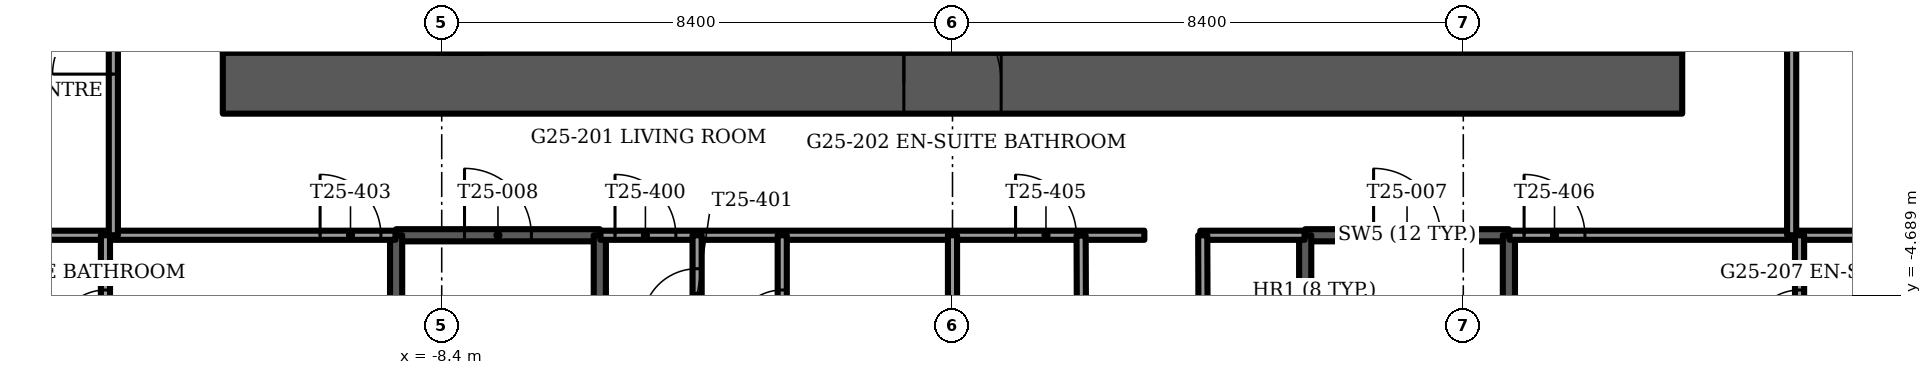
"""IFC4 building model, lengths in metres.
Left out: names, types, materials, properties, quantities, classifications, styles, units other than length and angle.
Written with IfcOpenShell. Run it as: python <this file> out.ifc"""

import sys

from ifc_helpers import new_model, si_unit, direction, frame, frame_2d, origin, place, context, subcontext, project, spatial, rectangle, extrude, element, fill, save


model = new_model("IFC4")
c1 = context("Model", 3, precision=1e-05, world=origin(), true_north=direction((0.0, 1.0)))
c2 = subcontext(c1, "Body", "Model", "MODEL_VIEW")
j1 = project(units=[si_unit("LENGTHUNIT", "METRE"), si_unit("PLANEANGLEUNIT", "RADIAN")], contexts=[c1])
p1 = place(None, origin())
s1 = spatial("IfcSite", under=j1, at=p1, CompositionType="ELEMENT")
p2 = place(p1, origin())
s2 = spatial("IfcBuilding", under=s1, at=p2, CompositionType="ELEMENT")
p3 = place(p2, frame((0.0, 0.0, 100.5)))
s3 = spatial("IfcBuildingStorey", under=s2, at=p3, CompositionType="ELEMENT", Elevation=100.5)
p4 = place(p3, frame((-12.0, -1.2, -0.3), z_axis=(0.0, 0.0, 1.0), x_axis=(1.0, 0.0, 0.0)))
e1 = element("IfcWall", 1, at=p4, inside=s3, PredefinedType="SHEAR", context=c2, shape_type="SweptSolid", body=[
    extrude(rectangle(XDim=24.0, YDim=1.0, at=frame_2d((12.0, 0.0))), origin(), (0.0, 0.0, 1.0), 3.75),
])
p5 = place(p4, frame((11.2, 0.0, 0.0)))
e2 = element("IfcOpeningElement", 2, at=p5, cuts=e1, PredefinedType="OPENING", context=c2, shape_type="SweptSolid", body=[
    extrude(rectangle(XDim=1.6, YDim=2.1, at=frame_2d((0.8, 1.05))), frame((0.0, 0.5, 0.0), z_axis=(0.0, -1.0, 0.0), x_axis=(1.0, 0.0, 0.0)), (0.0, 0.0, 1.0), 1.0),
])
p6 = place(p3, frame((-19.047, -0.86, 0.0), z_axis=(0.0, 0.0, 1.0), x_axis=(0.499999897272, -0.866025463095, 0.0)))
e3 = element("IfcWall", 3, at=p6, inside=s3, PredefinedType="SOLIDWALL", context=c2, shape_type="SweptSolid", body=[
    extrude(rectangle(XDim=11.426, YDim=0.15, at=frame_2d((5.713, 0.0))), origin(), (0.0, 0.0, 1.0), 3.45),
])
p7 = place(p6, frame((4.406, 0.0, 0.15)))
e4 = element("IfcOpeningElement", 4, at=p7, cuts=e3, PredefinedType="OPENING", context=c2, shape_type="SweptSolid", body=[
    extrude(rectangle(XDim=1.5, YDim=2.2, at=frame_2d((0.75, 1.1))), frame((0.0, 0.075, 0.0), z_axis=(0.0, -1.0, 0.0), x_axis=(1.0, 0.0, 0.0)), (0.0, 0.0, 1.0), 0.15),
])
p8 = place(p6, frame((6.979, 0.0, 0.15)))
e5 = element("IfcOpeningElement", 5, at=p8, cuts=e3, PredefinedType="OPENING", context=c2, shape_type="SweptSolid", body=[
    extrude(rectangle(XDim=1.7, YDim=2.2, at=frame_2d((0.85, 1.1))), frame((0.0, 0.075, 0.0), z_axis=(0.0, -1.0, 0.0), x_axis=(1.0, 0.0, 0.0)), (0.0, 0.0, 1.0), 0.15),
])
p9 = place(p3, frame((13.334, -10.755, 0.0), z_axis=(0.0, 0.0, 1.0), x_axis=(0.499999897272, 0.866025463095, 0.0)))
e6 = element("IfcWall", 6, at=p9, inside=s3, PredefinedType="SOLIDWALL", context=c2, shape_type="SweptSolid", body=[
    extrude(rectangle(XDim=11.426, YDim=0.15, at=frame_2d((5.713, 0.0))), origin(), (0.0, 0.0, 1.0), 3.45),
])
p10 = place(p9, frame((0.847, 0.0, 0.15)))
e7 = element("IfcOpeningElement", 7, at=p10, cuts=e6, PredefinedType="OPENING", context=c2, shape_type="SweptSolid", body=[
    extrude(rectangle(XDim=1.7, YDim=2.2, at=frame_2d((0.85, 1.1))), frame((0.0, 0.075, 0.0), z_axis=(0.0, -1.0, 0.0), x_axis=(1.0, 0.0, 0.0)), (0.0, 0.0, 1.0), 0.15),
])
p11 = place(p9, frame((6.322, 0.0, 0.15)))
e8 = element("IfcOpeningElement", 8, at=p11, cuts=e6, PredefinedType="OPENING", context=c2, shape_type="SweptSolid", body=[
    extrude(rectangle(XDim=1.5, YDim=2.2, at=frame_2d((0.75, 1.1))), frame((0.0, 0.075, 0.0), z_axis=(0.0, -1.0, 0.0), x_axis=(1.0, 0.0, 0.0)), (0.0, 0.0, 1.0), 0.15),
])
for number, where, z_axis, x_axis in (
    (9, (-6.4, -0.7, 0.0), (0.0, 0.0, 1.0), (0.0, 1.0, 0.0)),
    (10, (-5.1, -0.7, 0.0), (0.0, 0.0, 1.0), (0.0, 1.0, 0.0)),
    (11, (5.1, -0.7, 0.0), (0.0, 0.0, 1.0), (0.0, 1.0, 0.0)),
    (12, (6.4, -0.7, 0.0), (0.0, 0.0, 1.0), (0.0, 1.0, 0.0)),
):
    element("IfcWall", number, at=place(p3, frame(where, z_axis=z_axis, x_axis=x_axis)), inside=s3, PredefinedType="PARTITIONING", context=c2, shape_type="SweptSolid", body=[
        extrude(rectangle(XDim=1.6, YDim=0.15, at=frame_2d((0.8, 0.0))), origin(), (0.0, 0.0, 1.0), 3.45),
    ])
p12 = place(p3, frame((5.8, -3.7, -0.3), z_axis=(0.0, 0.0, 1.0), x_axis=(1.0, 0.0, 0.0)))
e13 = element("IfcWall", 13, at=p12, inside=s3, PredefinedType="SOLIDWALL", context=c2, shape_type="SweptSolid", body=[
    extrude(rectangle(XDim=3.35, YDim=0.2, at=frame_2d((1.675, 0.0))), origin(), (0.0, 0.0, 1.0), 3.75),
])
p13 = place(p12, frame((1.125, 0.0, 0.0)))
e14 = element("IfcOpeningElement", 14, at=p13, cuts=e13, PredefinedType="OPENING", context=c2, shape_type="SweptSolid", body=[
    extrude(rectangle(XDim=1.1, YDim=2.1, at=frame_2d((0.55, 1.05))), frame((0.0, 0.1, 0.0), z_axis=(0.0, -1.0, 0.0), x_axis=(1.0, 0.0, 0.0)), (0.0, 0.0, 1.0), 0.2),
])
for number, where, z_axis, x_axis in (
    (15, (5.8, -3.7, -0.3), (0.0, 0.0, 1.0), (0.0, -1.0, 0.0)),
    (16, (9.15, -3.7, -0.3), (0.0, 0.0, 1.0), (0.0, -1.0, 0.0)),
):
    element("IfcWall", number, at=place(p3, frame(where, z_axis=z_axis, x_axis=x_axis)), inside=s3, PredefinedType="SOLIDWALL", context=c2, shape_type="SweptSolid", body=[
        extrude(rectangle(XDim=7.7, YDim=0.2, at=frame_2d((3.85, 0.0))), origin(), (0.0, 0.0, 1.0), 3.75),
    ])
p14 = place(p3, frame((-9.15, -3.7, -0.3), z_axis=(0.0, 0.0, 1.0), x_axis=(1.0, 0.0, 0.0)))
e17 = element("IfcWall", 17, at=p14, inside=s3, PredefinedType="SOLIDWALL", context=c2, shape_type="SweptSolid", body=[
    extrude(rectangle(XDim=3.35, YDim=0.2, at=frame_2d((1.675, 0.0))), origin(), (0.0, 0.0, 1.0), 3.75),
])
p15 = place(p14, frame((1.125, 0.0, 0.0)))
e18 = element("IfcOpeningElement", 18, at=p15, cuts=e17, PredefinedType="OPENING", context=c2, shape_type="SweptSolid", body=[
    extrude(rectangle(XDim=1.1, YDim=2.1, at=frame_2d((0.55, 1.05))), frame((0.0, 0.1, 0.0), z_axis=(0.0, -1.0, 0.0), x_axis=(1.0, 0.0, 0.0)), (0.0, 0.0, 1.0), 0.2),
])
for number, where, z_axis, x_axis in (
    (19, (-9.15, -3.7, -0.3), (0.0, 0.0, 1.0), (0.0, -1.0, 0.0)),
    (20, (-5.8, -3.7, -0.3), (0.0, 0.0, 1.0), (0.0, -1.0, 0.0)),
):
    element("IfcWall", number, at=place(p3, frame(where, z_axis=z_axis, x_axis=x_axis)), inside=s3, PredefinedType="SOLIDWALL", context=c2, shape_type="SweptSolid", body=[
        extrude(rectangle(XDim=7.7, YDim=0.2, at=frame_2d((3.85, 0.0))), origin(), (0.0, 0.0, 1.0), 3.75),
    ])
p16 = place(p3, frame((-17.459, -3.7, 0.0), z_axis=(0.0, 0.0, 1.0), x_axis=(1.0, 0.0, 0.0)))
e21 = element("IfcWall", 21, at=p16, inside=s3, PredefinedType="PARTITIONING", context=c2, shape_type="SweptSolid", body=[
    extrude(rectangle(XDim=8.299, YDim=0.15, at=frame_2d((4.149, 0.0))), origin(), (0.0, 0.0, 1.0), 3.45),
])
p17 = place(p16, frame((7.059, 0.0, 0.0)))
e22 = element("IfcOpeningElement", 22, at=p17, cuts=e21, PredefinedType="OPENING", context=c2, shape_type="SweptSolid", body=[
    extrude(rectangle(XDim=1.0, YDim=2.1, at=frame_2d((0.5, 1.05))), frame((0.0, 0.075, 0.0), z_axis=(0.0, -1.0, 0.0), x_axis=(1.0, 0.0, 0.0)), (0.0, 0.0, 1.0), 0.15),
])
p18 = place(p3, frame((-5.79, -3.7, 0.0), z_axis=(0.0, 0.0, 1.0), x_axis=(1.0, 0.0, 0.0)))
e23 = element("IfcWall", 23, at=p18, inside=s3, PredefinedType="PARTITIONING", context=c2, shape_type="SweptSolid", body=[
    extrude(rectangle(XDim=8.945, YDim=0.15, at=frame_2d((4.473, 0.0))), origin(), (0.0, 0.0, 1.0), 3.45),
])
p19 = place(p18, frame((0.24, 0.0, 0.0)))
e24 = element("IfcOpeningElement", 24, at=p19, cuts=e23, PredefinedType="OPENING", context=c2, shape_type="SweptSolid", body=[
    extrude(rectangle(XDim=1.0, YDim=2.1, at=frame_2d((0.5, 1.05))), frame((0.0, 0.075, 0.0), z_axis=(0.0, -1.0, 0.0), x_axis=(1.0, 0.0, 0.0)), (0.0, 0.0, 1.0), 0.15),
])
p20 = place(p18, frame((6.827, 0.0, 0.0)))
e25 = element("IfcOpeningElement", 25, at=p20, cuts=e23, PredefinedType="OPENING", context=c2, shape_type="SweptSolid", body=[
    extrude(rectangle(XDim=1.0, YDim=2.1, at=frame_2d((0.5, 1.05))), frame((0.0, 0.075, 0.0), z_axis=(0.0, -1.0, 0.0), x_axis=(1.0, 0.0, 0.0)), (0.0, 0.0, 1.0), 0.15),
])
p21 = place(p3, frame((4.075, -3.7, 0.0), z_axis=(0.0, 0.0, 1.0), x_axis=(1.0, 0.0, 0.0)))
e26 = element("IfcWall", 26, at=p21, inside=s3, PredefinedType="PARTITIONING", context=c2, shape_type="SweptSolid", body=[
    extrude(rectangle(XDim=1.715, YDim=0.15, at=frame_2d((0.857, 0.0))), origin(), (0.0, 0.0, 1.0), 3.45),
])
p22 = place(p3, frame((9.16, -3.7, 0.0), z_axis=(0.0, 0.0, 1.0), x_axis=(1.0, 0.0, 0.0)))
e27 = element("IfcWall", 27, at=p22, inside=s3, PredefinedType="PARTITIONING", context=c2, shape_type="SweptSolid", body=[
    extrude(rectangle(XDim=8.299, YDim=0.15, at=frame_2d((4.149, 0.0))), origin(), (0.0, 0.0, 1.0), 3.45),
])
p23 = place(p22, frame((0.24, 0.0, 0.0)))
e28 = element("IfcOpeningElement", 28, at=p23, cuts=e27, PredefinedType="OPENING", context=c2, shape_type="SweptSolid", body=[
    extrude(rectangle(XDim=1.0, YDim=2.1, at=frame_2d((0.5, 1.05))), frame((0.0, 0.075, 0.0), z_axis=(0.0, -1.0, 0.0), x_axis=(1.0, 0.0, 0.0)), (0.0, 0.0, 1.0), 0.15),
])
p24 = place(p3, frame((13.93, -6.3, 0.0), z_axis=(0.0, 0.0, 1.0), x_axis=(0.0, 1.0, 0.0)))
e29 = element("IfcWall", 29, at=p24, inside=s3, PredefinedType="PARTITIONING", context=c2, shape_type="SweptSolid", body=[
    extrude(rectangle(XDim=2.6, YDim=0.15, at=frame_2d((1.3, 0.0))), origin(), (0.0, 0.0, 1.0), 3.45),
])
p25 = place(p24, frame((0.9, 0.0, 0.0)))
e30 = element("IfcOpeningElement", 30, at=p25, cuts=e29, PredefinedType="OPENING", context=c2, shape_type="SweptSolid", body=[
    extrude(rectangle(XDim=0.8, YDim=2.1, at=frame_2d((0.4, 1.05))), frame((0.0, 0.075, 0.0), z_axis=(0.0, -1.0, 0.0), x_axis=(1.0, 0.0, 0.0)), (0.0, 0.0, 1.0), 0.15),
])
p26 = place(p3, frame((13.8, -3.7, 0.0), z_axis=(0.0, 0.0, 1.0), x_axis=(0.0, 1.0, 0.0)))
e31 = element("IfcWall", 31, at=p26, inside=s3, PredefinedType="PARTITIONING", context=c2, shape_type="SweptSolid", body=[
    extrude(rectangle(XDim=13.083, YDim=0.15, at=frame_2d((6.542, 0.0))), origin(), (0.0, 0.0, 1.0), 3.45),
])
p27 = place(p26, frame((3.7, 0.0, 0.0)))
e32 = element("IfcOpeningElement", 32, at=p27, cuts=e31, PredefinedType="OPENING", context=c2, shape_type="SweptSolid", body=[
    extrude(rectangle(XDim=1.0, YDim=2.1, at=frame_2d((0.5, 1.05))), frame((0.0, 0.075, 0.0), z_axis=(0.0, -1.0, 0.0), x_axis=(1.0, 0.0, 0.0)), (0.0, 0.0, 1.0), 0.15),
])
p28 = place(p26, frame((10.12, 0.0, 0.0)))
e33 = element("IfcOpeningElement", 33, at=p28, cuts=e31, PredefinedType="OPENING", context=c2, shape_type="SweptSolid", body=[
    extrude(rectangle(XDim=1.0, YDim=2.1, at=frame_2d((0.5, 1.05))), frame((0.0, 0.075, 0.0), z_axis=(0.0, -1.0, 0.0), x_axis=(1.0, 0.0, 0.0)), (0.0, 0.0, 1.0), 0.15),
])
p29 = place(p3, frame((0.0, -9.01, 0.0), z_axis=(0.0, 0.0, 1.0), x_axis=(0.0, 1.0, 0.0)))
e34 = element("IfcWall", 34, at=p29, inside=s3, PredefinedType="PARTITIONING", context=c2, shape_type="SweptSolid", body=[
    extrude(rectangle(XDim=5.31, YDim=0.15, at=frame_2d((2.655, 0.0))), origin(), (0.0, 0.0, 1.0), 3.45),
])
p30 = place(p3, frame((-2.8, -6.3, 0.0), z_axis=(0.0, 0.0, 1.0), x_axis=(0.0, 1.0, 0.0)))
e35 = element("IfcWall", 35, at=p30, inside=s3, PredefinedType="PARTITIONING", context=c2, shape_type="SweptSolid", body=[
    extrude(rectangle(XDim=2.6, YDim=0.15, at=frame_2d((1.3, 0.0))), origin(), (0.0, 0.0, 1.0), 3.45),
])
p31 = place(p30, frame((0.9, 0.0, 0.0)))
e36 = element("IfcOpeningElement", 36, at=p31, cuts=e35, PredefinedType="OPENING", context=c2, shape_type="SweptSolid", body=[
    extrude(rectangle(XDim=0.8, YDim=2.1, at=frame_2d((0.4, 1.05))), frame((0.0, 0.075, 0.0), z_axis=(0.0, -1.0, 0.0), x_axis=(1.0, 0.0, 0.0)), (0.0, 0.0, 1.0), 0.15),
])
p32 = place(p3, frame((-4.2, -9.01, 0.0), z_axis=(0.0, 0.0, 1.0), x_axis=(0.0, 1.0, 0.0)))
e37 = element("IfcWall", 37, at=p32, inside=s3, PredefinedType="PARTITIONING", context=c2, shape_type="SweptSolid", body=[
    extrude(rectangle(XDim=5.31, YDim=0.15, at=frame_2d((2.655, 0.0))), origin(), (0.0, 0.0, 1.0), 3.45),
])
p33 = place(p32, frame((3.86, 0.0, 0.0)))
e38 = element("IfcOpeningElement", 38, at=p33, cuts=e37, PredefinedType="OPENING", context=c2, shape_type="SweptSolid", body=[
    extrude(rectangle(XDim=0.9, YDim=2.1, at=frame_2d((0.45, 1.05))), frame((0.0, 0.075, 0.0), z_axis=(0.0, -1.0, 0.0), x_axis=(1.0, 0.0, 0.0)), (0.0, 0.0, 1.0), 0.15),
])
p34 = place(p3, frame((-13.8, -3.7, 0.0), z_axis=(0.0, 0.0, 1.0), x_axis=(0.0, 1.0, 0.0)))
e39 = element("IfcWall", 39, at=p34, inside=s3, PredefinedType="PARTITIONING", context=c2, shape_type="SweptSolid", body=[
    extrude(rectangle(XDim=13.083, YDim=0.15, at=frame_2d((6.542, 0.0))), origin(), (0.0, 0.0, 1.0), 3.45),
])
p35 = place(p34, frame((2.65, 0.0, 0.0)))
e40 = element("IfcOpeningElement", 40, at=p35, cuts=e39, PredefinedType="OPENING", context=c2, shape_type="SweptSolid", body=[
    extrude(rectangle(XDim=1.0, YDim=2.1, at=frame_2d((0.5, 1.05))), frame((0.0, 0.075, 0.0), z_axis=(0.0, -1.0, 0.0), x_axis=(1.0, 0.0, 0.0)), (0.0, 0.0, 1.0), 0.15),
])
p36 = place(p34, frame((9.07, 0.0, 0.0)))
e41 = element("IfcOpeningElement", 41, at=p36, cuts=e39, PredefinedType="OPENING", context=c2, shape_type="SweptSolid", body=[
    extrude(rectangle(XDim=1.0, YDim=2.1, at=frame_2d((0.5, 1.05))), frame((0.0, 0.075, 0.0), z_axis=(0.0, -1.0, 0.0), x_axis=(1.0, 0.0, 0.0)), (0.0, 0.0, 1.0), 0.15),
])
p37 = place(p3, frame((-13.93, -6.3, 0.0), z_axis=(0.0, 0.0, 1.0), x_axis=(0.0, 1.0, 0.0)))
e42 = element("IfcWall", 42, at=p37, inside=s3, PredefinedType="PARTITIONING", context=c2, shape_type="SweptSolid", body=[
    extrude(rectangle(XDim=2.6, YDim=0.15, at=frame_2d((1.3, 0.0))), origin(), (0.0, 0.0, 1.0), 3.45),
])
p38 = place(p37, frame((0.9, 0.0, 0.0)))
e43 = element("IfcOpeningElement", 43, at=p38, cuts=e42, PredefinedType="OPENING", context=c2, shape_type="SweptSolid", body=[
    extrude(rectangle(XDim=0.8, YDim=2.1, at=frame_2d((0.4, 1.05))), frame((0.0, 0.075, 0.0), z_axis=(0.0, -1.0, 0.0), x_axis=(1.0, 0.0, 0.0)), (0.0, 0.0, 1.0), 0.15),
])
p39 = place(p3, frame((4.134, -8.87, 0.0), z_axis=(0.0, 0.0, 1.0), x_axis=(-0.003683216269, 0.999993216936, 0.0)))
e44 = element("IfcWall", 44, at=p39, inside=s3, PredefinedType="PARTITIONING", context=c2, shape_type="SweptSolid", body=[
    extrude(rectangle(XDim=5.17, YDim=0.15, at=frame_2d((2.585, 0.0))), origin(), (0.0, 0.0, 1.0), 3.45),
])
p40 = place(p3, frame((2.134, -8.87, 0.0), z_axis=(0.0, 0.0, 1.0), x_axis=(-0.003686872276, 0.999993203463, 0.0)))
e45 = element("IfcWall", 45, at=p40, inside=s3, PredefinedType="PARTITIONING", context=c2, shape_type="SweptSolid", body=[
    extrude(rectangle(XDim=5.165, YDim=0.15, at=frame_2d((2.583, 0.0))), origin(), (0.0, 0.0, 1.0), 3.45),
])
p41 = place(p5, origin())
e46 = element("IfcDoor", 46, at=p41, inside=s3, OperationType="DOUBLE_DOOR_SINGLE_SWING", PredefinedType="DOOR", context=c2, shape_type="SweptSolid", body=[
    extrude(rectangle(XDim=1.6, YDim=2.1, at=frame_2d((0.8, 1.05))), frame((0.0, 0.025, 0.0), z_axis=(0.0, -1.0, 0.0), x_axis=(1.0, 0.0, 0.0)), (0.0, 0.0, 1.0), 0.05),
])
fill(e2, e46)
p42 = place(p13, origin())
e47 = element("IfcDoor", 47, at=p42, inside=s3, OperationType="SINGLE_SWING_LEFT", PredefinedType="DOOR", context=c2, shape_type="SweptSolid", body=[
    extrude(rectangle(XDim=1.1, YDim=2.1, at=frame_2d((0.55, 1.05))), frame((0.0, 0.025, 0.0), z_axis=(0.0, -1.0, 0.0), x_axis=(1.0, 0.0, 0.0)), (0.0, 0.0, 1.0), 0.05),
])
fill(e14, e47)
p43 = place(p15, origin())
e48 = element("IfcDoor", 48, at=p43, inside=s3, OperationType="SINGLE_SWING_LEFT", PredefinedType="DOOR", context=c2, shape_type="SweptSolid", body=[
    extrude(rectangle(XDim=1.1, YDim=2.1, at=frame_2d((0.55, 1.05))), frame((0.0, 0.025, 0.0), z_axis=(0.0, -1.0, 0.0), x_axis=(1.0, 0.0, 0.0)), (0.0, 0.0, 1.0), 0.05),
])
fill(e18, e48)
p44 = place(p19, origin())
e49 = element("IfcDoor", 49, at=p44, inside=s3, OperationType="SINGLE_SWING_LEFT", PredefinedType="DOOR", context=c2, shape_type="SweptSolid", body=[
    extrude(rectangle(XDim=1.0, YDim=2.1, at=frame_2d((0.5, 1.05))), frame((0.0, 0.025, 0.0), z_axis=(0.0, -1.0, 0.0), x_axis=(1.0, 0.0, 0.0)), (0.0, 0.0, 1.0), 0.05),
])
fill(e24, e49)
p45 = place(p33, origin())
e50 = element("IfcDoor", 50, at=p45, inside=s3, OperationType="SINGLE_SWING_RIGHT", PredefinedType="DOOR", context=c2, shape_type="SweptSolid", body=[
    extrude(rectangle(XDim=0.9, YDim=2.1, at=frame_2d((0.45, 1.05))), frame((0.0, 0.025, 0.0), z_axis=(0.0, -1.0, 0.0), x_axis=(1.0, 0.0, 0.0)), (0.0, 0.0, 1.0), 0.05),
])
fill(e38, e50)
p46 = place(p31, origin())
e51 = element("IfcDoor", 51, at=p46, inside=s3, OperationType="SINGLE_SWING_RIGHT", PredefinedType="DOOR", context=c2, shape_type="SweptSolid", body=[
    extrude(rectangle(XDim=0.8, YDim=2.1, at=frame_2d((0.4, 1.05))), frame((0.0, 0.025, 0.0), z_axis=(0.0, -1.0, 0.0), x_axis=(1.0, 0.0, 0.0)), (0.0, 0.0, 1.0), 0.05),
])
fill(e36, e51)
p47 = place(p17, origin())
e52 = element("IfcDoor", 52, at=p47, inside=s3, OperationType="SINGLE_SWING_RIGHT", PredefinedType="DOOR", context=c2, shape_type="SweptSolid", body=[
    extrude(rectangle(XDim=1.0, YDim=2.1, at=frame_2d((0.5, 1.05))), frame((0.0, 0.025, 0.0), z_axis=(0.0, -1.0, 0.0), x_axis=(1.0, 0.0, 0.0)), (0.0, 0.0, 1.0), 0.05),
])
fill(e22, e52)
p48 = place(p38, origin())
e53 = element("IfcDoor", 53, at=p48, inside=s3, OperationType="SINGLE_SWING_RIGHT", PredefinedType="DOOR", context=c2, shape_type="SweptSolid", body=[
    extrude(rectangle(XDim=0.8, YDim=2.1, at=frame_2d((0.4, 1.05))), frame((0.0, 0.025, 0.0), z_axis=(0.0, -1.0, 0.0), x_axis=(1.0, 0.0, 0.0)), (0.0, 0.0, 1.0), 0.05),
])
fill(e43, e53)
p49 = place(p20, origin())
e54 = element("IfcDoor", 54, at=p49, inside=s3, OperationType="SINGLE_SWING_LEFT", PredefinedType="DOOR", context=c2, shape_type="SweptSolid", body=[
    extrude(rectangle(XDim=1.0, YDim=2.1, at=frame_2d((0.5, 1.05))), frame((0.0, 0.025, 0.0), z_axis=(0.0, -1.0, 0.0), x_axis=(1.0, 0.0, 0.0)), (0.0, 0.0, 1.0), 0.05),
])
fill(e25, e54)
p50 = place(p23, origin())
e55 = element("IfcDoor", 55, at=p50, inside=s3, OperationType="SINGLE_SWING_LEFT", PredefinedType="DOOR", context=c2, shape_type="SweptSolid", body=[
    extrude(rectangle(XDim=1.0, YDim=2.1, at=frame_2d((0.5, 1.05))), frame((0.0, 0.025, 0.0), z_axis=(0.0, -1.0, 0.0), x_axis=(1.0, 0.0, 0.0)), (0.0, 0.0, 1.0), 0.05),
])
fill(e28, e55)
p51 = place(p25, origin())
e56 = element("IfcDoor", 56, at=p51, inside=s3, OperationType="SINGLE_SWING_RIGHT", PredefinedType="DOOR", context=c2, shape_type="SweptSolid", body=[
    extrude(rectangle(XDim=0.8, YDim=2.1, at=frame_2d((0.4, 1.05))), frame((0.0, 0.025, 0.0), z_axis=(0.0, -1.0, 0.0), x_axis=(1.0, 0.0, 0.0)), (0.0, 0.0, 1.0), 0.05),
])
fill(e30, e56)
p52 = place(p35, origin())
e57 = element("IfcDoor", 57, at=p52, inside=s3, OperationType="SINGLE_SWING_RIGHT", PredefinedType="DOOR", context=c2, shape_type="SweptSolid", body=[
    extrude(rectangle(XDim=1.0, YDim=2.1, at=frame_2d((0.5, 1.05))), frame((0.0, 0.025, 0.0), z_axis=(0.0, -1.0, 0.0), x_axis=(1.0, 0.0, 0.0)), (0.0, 0.0, 1.0), 0.05),
])
fill(e40, e57)
save(model, sys.argv[1])
